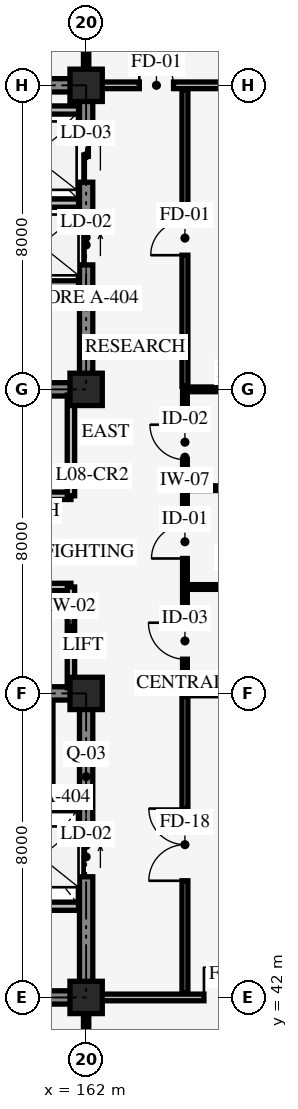
"""IFC4 building model, lengths in metres.
Left out: names, types, materials, properties, quantities, classifications, styles, units other than length and angle.
Written with IfcOpenShell. Run it as: python <this file> out.ifc"""

import sys

from ifc_helpers import new_model, si_unit, direction, frame, frame_2d, origin, origin_2d, place, context, subcontext, project, spatial, rectangle, extrude, element, fill, save


model = new_model("IFC4")
c1 = context("Model", 3, precision=1e-05, world=origin(), true_north=direction((0.0, 1.0)))
c2 = subcontext(c1, "Body", "Model", "MODEL_VIEW")
j1 = project(units=[si_unit("LENGTHUNIT", "METRE"), si_unit("PLANEANGLEUNIT", "RADIAN")], contexts=[c1])
p1 = place(None, origin())
s1 = spatial("IfcSite", under=j1, at=p1, CompositionType="ELEMENT")
p2 = place(p1, origin())
s2 = spatial("IfcBuilding", under=s1, at=p2, CompositionType="ELEMENT")
p3 = place(p2, frame((0.0, 0.0, 31.8)))
s3 = spatial("IfcBuildingStorey", under=s2, at=p3, CompositionType="ELEMENT", Elevation=31.8)
p4 = place(p3, frame((154.0, 42.0, 0.0), z_axis=(0.0, 0.0, 1.0), x_axis=(1.0, 0.0, 0.0)))
e1 = element("IfcWall", 1, at=p4, inside=s3, PredefinedType="SHEAR", context=c2, shape_type="SweptSolid", body=[
    extrude(rectangle(XDim=8.0, YDim=0.35, at=frame_2d((4.0, 0.0))), origin(), (0.0, 0.0, 1.0), 3.95),
])
p5 = place(p3, frame((162.0, 42.0, 0.0), z_axis=(0.0, 0.0, 1.0), x_axis=(0.0, 1.0, 0.0)))
e2 = element("IfcWall", 2, at=p5, inside=s3, PredefinedType="SHEAR", context=c2, shape_type="SweptSolid", body=[
    extrude(rectangle(XDim=8.0, YDim=0.35, at=frame_2d((4.0, 0.0))), origin(), (0.0, 0.0, 1.0), 3.95),
])
p6 = place(p5, frame((3.175, 0.0, 0.0)))
e3 = element("IfcOpeningElement", 3, at=p6, cuts=e2, PredefinedType="OPENING", context=c2, shape_type="SweptSolid", body=[
    extrude(rectangle(XDim=1.05, YDim=2.2, at=frame_2d((0.525, 1.1))), frame((0.0, 0.185, 0.0), z_axis=(0.0, -1.0, 0.0), x_axis=(1.0, 0.0, 0.0)), (0.0, 0.0, 1.0), 0.37),
])
p7 = place(p3, frame((162.0, 50.0, 0.0), z_axis=(0.0, 0.0, 1.0), x_axis=(-1.0, 0.0, 0.0)))
e4 = element("IfcWall", 4, at=p7, inside=s3, PredefinedType="SHEAR", context=c2, shape_type="SweptSolid", body=[
    extrude(rectangle(XDim=8.0, YDim=0.35, at=frame_2d((4.0, 0.0))), origin(), (0.0, 0.0, 1.0), 3.95),
])
p8 = place(p7, frame((5.3, 0.0, 0.0)))
e5 = element("IfcOpeningElement", 5, at=p8, cuts=e4, PredefinedType="OPENING", context=c2, shape_type="SweptSolid", body=[
    extrude(rectangle(XDim=1.3, YDim=2.15, at=frame_2d((0.65, 1.075))), frame((0.0, 0.185, 0.0), z_axis=(0.0, -1.0, 0.0), x_axis=(1.0, 0.0, 0.0)), (0.0, 0.0, 1.0), 0.37),
])
p9 = place(p7, frame((1.45, 0.0, 0.0)))
e6 = element("IfcOpeningElement", 6, at=p9, cuts=e4, PredefinedType="OPENING", context=c2, shape_type="SweptSolid", body=[
    extrude(rectangle(XDim=1.1, YDim=2.2, at=frame_2d((0.55, 1.1))), frame((0.0, 0.185, 0.0), z_axis=(0.0, -1.0, 0.0), x_axis=(1.0, 0.0, 0.0)), (0.0, 0.0, 1.0), 0.37),
])
p10 = place(p3, frame((154.0, 58.0, 0.0), z_axis=(0.0, 0.0, 1.0), x_axis=(1.0, 0.0, 0.0)))
e7 = element("IfcWall", 7, at=p10, inside=s3, PredefinedType="SHEAR", context=c2, shape_type="SweptSolid", body=[
    extrude(rectangle(XDim=8.0, YDim=0.35, at=frame_2d((4.0, 0.0))), origin(), (0.0, 0.0, 1.0), 3.95),
])
p11 = place(p10, frame((1.4, 0.0, 0.0)))
e8 = element("IfcOpeningElement", 8, at=p11, cuts=e7, PredefinedType="OPENING", context=c2, shape_type="SweptSolid", body=[
    extrude(rectangle(XDim=1.3, YDim=2.15, at=frame_2d((0.65, 1.075))), frame((0.0, 0.185, 0.0), z_axis=(0.0, -1.0, 0.0), x_axis=(1.0, 0.0, 0.0)), (0.0, 0.0, 1.0), 0.37),
])
p12 = place(p10, frame((5.3, 0.0, 0.0)))
e9 = element("IfcOpeningElement", 9, at=p12, cuts=e7, PredefinedType="OPENING", context=c2, shape_type="SweptSolid", body=[
    extrude(rectangle(XDim=1.1, YDim=2.2, at=frame_2d((0.55, 1.1))), frame((0.0, 0.185, 0.0), z_axis=(0.0, -1.0, 0.0), x_axis=(1.0, 0.0, 0.0)), (0.0, 0.0, 1.0), 0.37),
])
p13 = place(p3, frame((162.0, 58.0, 0.0), z_axis=(0.0, 0.0, 1.0), x_axis=(0.0, 1.0, 0.0)))
e10 = element("IfcWall", 10, at=p13, inside=s3, PredefinedType="SHEAR", context=c2, shape_type="SweptSolid", body=[
    extrude(rectangle(XDim=8.0, YDim=0.35, at=frame_2d((4.0, 0.0))), origin(), (0.0, 0.0, 1.0), 3.95),
])
p14 = place(p13, frame((3.275, 0.0, 0.0)))
e11 = element("IfcOpeningElement", 11, at=p14, cuts=e10, PredefinedType="OPENING", context=c2, shape_type="SweptSolid", body=[
    extrude(rectangle(XDim=1.05, YDim=2.2, at=frame_2d((0.525, 1.1))), frame((0.0, 0.185, 0.0), z_axis=(0.0, -1.0, 0.0), x_axis=(1.0, 0.0, 0.0)), (0.0, 0.0, 1.0), 0.37),
])
p15 = place(p13, frame((5.45, 0.0, 0.0)))
e12 = element("IfcOpeningElement", 12, at=p15, cuts=e10, PredefinedType="OPENING", context=c2, shape_type="SweptSolid", body=[
    extrude(rectangle(XDim=1.4, YDim=2.3, at=frame_2d((0.7, 1.15))), frame((0.0, 0.185, 0.0), z_axis=(0.0, -1.0, 0.0), x_axis=(1.0, 0.0, 0.0)), (0.0, 0.0, 1.0), 0.37),
])
p16 = place(p3, frame((162.0, 66.0, 0.0), z_axis=(0.0, 0.0, 1.0), x_axis=(-1.0, 0.0, 0.0)))
e13 = element("IfcWall", 13, at=p16, inside=s3, PredefinedType="SHEAR", context=c2, shape_type="SweptSolid", body=[
    extrude(rectangle(XDim=8.0, YDim=0.35, at=frame_2d((4.0, 0.0))), origin(), (0.0, 0.0, 1.0), 3.95),
])
for number, where, z_axis, x_axis in (
    (14, (162.0, 42.0, 0.0), (0.0, 0.0, 1.0), (1.0, 0.0, 0.0)),
    (15, (162.0, 50.0, 0.0), (0.0, 0.0, 1.0), (1.0, 0.0, 0.0)),
    (16, (162.0, 58.0, 0.0), (0.0, 0.0, 1.0), (1.0, 0.0, 0.0)),
    (17, (162.0, 66.0, 0.0), (0.0, 0.0, 1.0), (1.0, 0.0, 0.0)),
):
    element("IfcColumn", number, at=place(p3, frame(where, z_axis=z_axis, x_axis=x_axis)), inside=s3, PredefinedType="COLUMN", context=c2, shape_type="SweptSolid", body=[
        extrude(rectangle(XDim=0.85, YDim=0.85, at=origin_2d()), origin(), (0.0, 0.0, 1.0), 4.2),
    ])
p17 = place(p3, frame((158.45, 47.02, 0.0), z_axis=(0.0, 0.0, 1.0), x_axis=(1.0, 0.0, 0.0)))
e18 = element("IfcWall", 18, at=p17, inside=s3, PredefinedType="STANDARD", context=c2, shape_type="SweptSolid", body=[
    extrude(rectangle(XDim=3.35, YDim=0.215, at=frame_2d((1.675, 0.0))), origin(), (0.0, 0.0, 1.0), 3.9),
])
p18 = place(p3, frame((161.02, 47.02, 0.0), z_axis=(0.0, 0.0, 1.0), x_axis=(0.0, 1.0, 0.0)))
e19 = element("IfcWall", 19, at=p18, inside=s3, PredefinedType="STANDARD", context=c2, shape_type="SweptSolid", body=[
    extrude(rectangle(XDim=2.78, YDim=0.215, at=frame_2d((1.39, 0.0))), origin(), (0.0, 0.0, 1.0), 3.9),
])
p19 = place(p3, frame((159.78, 44.4, 0.0), z_axis=(0.0, 0.0, 1.0), x_axis=(1.0, 0.0, 0.0)))
e20 = element("IfcWall", 20, at=p19, inside=s3, PredefinedType="STANDARD", context=c2, shape_type="SweptSolid", body=[
    extrude(rectangle(XDim=2.02, YDim=0.215, at=frame_2d((1.01, 0.0))), origin(), (0.0, 0.0, 1.0), 3.9),
])
p20 = place(p3, frame((158.45, 62.9, 0.0), z_axis=(0.0, 0.0, 1.0), x_axis=(1.0, 0.0, 0.0)))
e21 = element("IfcWall", 21, at=p20, inside=s3, PredefinedType="STANDARD", context=c2, shape_type="SweptSolid", body=[
    extrude(rectangle(XDim=3.35, YDim=0.215, at=frame_2d((1.675, 0.0))), origin(), (0.0, 0.0, 1.0), 3.9),
])
p21 = place(p3, frame((159.38, 65.35, 0.0), z_axis=(0.0, 0.0, 1.0), x_axis=(1.0, 0.0, 0.0)))
e22 = element("IfcWall", 22, at=p21, inside=s3, PredefinedType="STANDARD", context=c2, shape_type="SweptSolid", body=[
    extrude(rectangle(XDim=2.42, YDim=0.215, at=frame_2d((1.21, 0.0))), origin(), (0.0, 0.0, 1.0), 3.9),
])
p22 = place(p3, frame((158.45, 60.75, 0.0), z_axis=(0.0, 0.0, 1.0), x_axis=(1.0, 0.0, 0.0)))
e23 = element("IfcWall", 23, at=p22, inside=s3, PredefinedType="STANDARD", context=c2, shape_type="SweptSolid", body=[
    extrude(rectangle(XDim=3.35, YDim=0.215, at=frame_2d((1.675, 0.0))), origin(), (0.0, 0.0, 1.0), 3.9),
])
p23 = place(p3, frame((154.0, 52.8, 0.0), z_axis=(0.0, 0.0, 1.0), x_axis=(1.0, 0.0, 0.0)))
e24 = element("IfcWall", 24, at=p23, inside=s3, PredefinedType="STANDARD", context=c2, shape_type="SweptSolid", body=[
    extrude(rectangle(XDim=7.6, YDim=0.195, at=frame_2d((3.8, 0.0))), origin(), (0.0, 0.0, 1.0), 3.9),
])
p24 = place(p23, frame((2.8, 0.0, 0.0)))
e25 = element("IfcOpeningElement", 25, at=p24, cuts=e24, PredefinedType="OPENING", context=c2, shape_type="SweptSolid", body=[
    extrude(rectangle(XDim=1.3, YDim=2.15, at=frame_2d((0.65, 1.075))), frame((0.0, 0.107, 0.0), z_axis=(0.0, -1.0, 0.0), x_axis=(1.0, 0.0, 0.0)), (0.0, 0.0, 1.0), 0.215),
])
p25 = place(p3, frame((161.6, 50.15, 0.0), z_axis=(0.0, 0.0, 1.0), x_axis=(0.0, 1.0, 0.0)))
e26 = element("IfcWall", 26, at=p25, inside=s3, PredefinedType="STANDARD", context=c2, shape_type="SweptSolid", body=[
    extrude(rectangle(XDim=2.65, YDim=0.195, at=frame_2d((1.325, 0.0))), origin(), (0.0, 0.0, 1.0), 3.31),
])
p26 = place(p3, frame((154.0, 55.2, 0.0), z_axis=(0.0, 0.0, 1.0), x_axis=(1.0, 0.0, 0.0)))
e27 = element("IfcWall", 27, at=p26, inside=s3, PredefinedType="STANDARD", context=c2, shape_type="SweptSolid", body=[
    extrude(rectangle(XDim=7.6, YDim=0.195, at=frame_2d((3.8, 0.0))), origin(), (0.0, 0.0, 1.0), 3.9),
])
p27 = place(p26, frame((2.8, 0.0, 0.0)))
e28 = element("IfcOpeningElement", 28, at=p27, cuts=e27, PredefinedType="OPENING", context=c2, shape_type="SweptSolid", body=[
    extrude(rectangle(XDim=1.4, YDim=2.2, at=frame_2d((0.7, 1.1))), frame((0.0, 0.107, 0.0), z_axis=(0.0, -1.0, 0.0), x_axis=(1.0, 0.0, 0.0)), (0.0, 0.0, 1.0), 0.215),
])
p28 = place(p3, frame((161.6, 55.2, 0.0), z_axis=(0.0, 0.0, 1.0), x_axis=(0.0, 1.0, 0.0)))
e29 = element("IfcWall", 29, at=p28, inside=s3, PredefinedType="STANDARD", context=c2, shape_type="SweptSolid", body=[
    extrude(rectangle(XDim=2.65, YDim=0.195, at=frame_2d((1.325, 0.0))), origin(), (0.0, 0.0, 1.0), 3.31),
])
p29 = place(p3, frame((164.6, 50.0, 0.0), z_axis=(0.0, 0.0, 1.0), x_axis=(0.0, 1.0, 0.0)))
e30 = element("IfcWall", 30, at=p29, inside=s3, PredefinedType="STANDARD", context=c2, shape_type="SweptSolid", body=[
    extrude(rectangle(XDim=8.0, YDim=0.125, at=frame_2d((4.0, 0.0))), origin(), (0.0, 0.0, 1.0), 3.9),
])
p30 = place(p29, frame((0.9, 0.0, 0.0)))
e31 = element("IfcOpeningElement", 31, at=p30, cuts=e30, PredefinedType="OPENING", context=c2, shape_type="SweptSolid", body=[
    extrude(rectangle(XDim=0.96, YDim=2.08, at=frame_2d((0.48, 1.04))), frame((0.0, 0.073, 0.0), z_axis=(0.0, -1.0, 0.0), x_axis=(1.0, 0.0, 0.0)), (0.0, 0.0, 1.0), 0.145),
])
p31 = place(p29, frame((3.55, 0.0, 0.0)))
e32 = element("IfcOpeningElement", 32, at=p31, cuts=e30, PredefinedType="OPENING", context=c2, shape_type="SweptSolid", body=[
    extrude(rectangle(XDim=0.88, YDim=2.05, at=frame_2d((0.44, 1.025))), frame((0.0, 0.073, 0.0), z_axis=(0.0, -1.0, 0.0), x_axis=(1.0, 0.0, 0.0)), (0.0, 0.0, 1.0), 0.145),
])
p32 = place(p29, frame((6.15, 0.0, 0.0)))
e33 = element("IfcOpeningElement", 33, at=p32, cuts=e30, PredefinedType="OPENING", context=c2, shape_type="SweptSolid", body=[
    extrude(rectangle(XDim=0.92, YDim=2.05, at=frame_2d((0.46, 1.025))), frame((0.0, 0.073, 0.0), z_axis=(0.0, -1.0, 0.0), x_axis=(1.0, 0.0, 0.0)), (0.0, 0.0, 1.0), 0.145),
])
p33 = place(p3, frame((164.6, 50.0, 0.0), z_axis=(0.0, 0.0, 1.0), x_axis=(1.0, 0.0, 0.0)))
e34 = element("IfcWall", 34, at=p33, inside=s3, PredefinedType="STANDARD", context=c2, shape_type="SweptSolid", body=[
    extrude(rectangle(XDim=3.8, YDim=0.125, at=frame_2d((1.9, 0.0))), origin(), (0.0, 0.0, 1.0), 3.26),
])
for number, where, z_axis, x_axis in (
    (35, (164.6, 52.8, 0.0), (0.0, 0.0, 1.0), (1.0, 0.0, 0.0)),
    (36, (164.6, 55.4, 0.0), (0.0, 0.0, 1.0), (1.0, 0.0, 0.0)),
):
    element("IfcWall", number, at=place(p3, frame(where, z_axis=z_axis, x_axis=x_axis)), inside=s3, PredefinedType="STANDARD", context=c2, shape_type="SweptSolid", body=[
        extrude(rectangle(XDim=3.8, YDim=0.125, at=frame_2d((1.9, 0.0))), origin(), (0.0, 0.0, 1.0), 3.9),
    ])
p34 = place(p3, frame((164.6, 58.0, 0.0), z_axis=(0.0, 0.0, 1.0), x_axis=(1.0, 0.0, 0.0)))
e37 = element("IfcWall", 37, at=p34, inside=s3, PredefinedType="STANDARD", context=c2, shape_type="SweptSolid", body=[
    extrude(rectangle(XDim=3.8, YDim=0.125, at=frame_2d((1.9, 0.0))), origin(), (0.0, 0.0, 1.0), 3.26),
])
p35 = place(p3, frame((164.6, 42.12, 0.0), z_axis=(0.0, 0.0, 1.0), x_axis=(0.0, 1.0, 0.0)))
e38 = element("IfcWall", 38, at=p35, inside=s3, PredefinedType="STANDARD", context=c2, shape_type="SweptSolid", body=[
    extrude(rectangle(XDim=7.8, YDim=0.155, at=frame_2d((3.9, 0.0))), origin(), (0.0, 0.0, 1.0), 3.9),
])
p36 = place(p35, frame((2.95, 0.0, 0.0)))
e39 = element("IfcOpeningElement", 39, at=p36, cuts=e38, PredefinedType="OPENING", context=c2, shape_type="SweptSolid", body=[
    extrude(rectangle(XDim=1.9, YDim=2.35, at=frame_2d((0.95, 1.175))), frame((0.0, 0.087, 0.0), z_axis=(0.0, -1.0, 0.0), x_axis=(1.0, 0.0, 0.0)), (0.0, 0.0, 1.0), 0.175),
])
p37 = place(p3, frame((164.6, 58.08, 0.0), z_axis=(0.0, 0.0, 1.0), x_axis=(0.0, 1.0, 0.0)))
e40 = element("IfcWall", 40, at=p37, inside=s3, PredefinedType="STANDARD", context=c2, shape_type="SweptSolid", body=[
    extrude(rectangle(XDim=7.8, YDim=0.155, at=frame_2d((3.9, 0.0))), origin(), (0.0, 0.0, 1.0), 3.9),
])
p38 = place(p37, frame((3.45, 0.0, 0.0)))
e41 = element("IfcOpeningElement", 41, at=p38, cuts=e40, PredefinedType="OPENING", context=c2, shape_type="SweptSolid", body=[
    extrude(rectangle(XDim=0.9, YDim=2.1, at=frame_2d((0.45, 1.05))), frame((0.0, 0.087, 0.0), z_axis=(0.0, -1.0, 0.0), x_axis=(1.0, 0.0, 0.0)), (0.0, 0.0, 1.0), 0.175),
])
p39 = place(p3, frame((162.0, 34.05, 0.0), z_axis=(0.0, 0.0, 1.0), x_axis=(0.0, 1.0, 0.0)))
e42 = element("IfcWall", 42, at=p39, inside=s3, PredefinedType="STANDARD", context=c2, shape_type="SweptSolid", body=[
    extrude(rectangle(XDim=7.83, YDim=0.14, at=frame_2d((3.915, 0.0))), origin(), (0.0, 0.0, 1.0), 3.31),
])
p40 = place(p39, frame((3.0, 0.0, 0.0)))
e43 = element("IfcOpeningElement", 43, at=p40, cuts=e42, PredefinedType="OPENING", context=c2, shape_type="SweptSolid", body=[
    extrude(rectangle(XDim=1.06, YDim=2.12, at=frame_2d((0.53, 1.06))), frame((0.0, 0.08, 0.0), z_axis=(0.0, -1.0, 0.0), x_axis=(1.0, 0.0, 0.0)), (0.0, 0.0, 1.0), 0.16),
])
p41 = place(p3, frame((162.35, 42.0, 0.0), z_axis=(0.0, 0.0, 1.0), x_axis=(1.0, 0.0, 0.0)))
e44 = element("IfcWall", 44, at=p41, inside=s3, PredefinedType="STANDARD", context=c2, shape_type="SweptSolid", body=[
    extrude(rectangle(XDim=14.7, YDim=0.175, at=frame_2d((7.35, 0.0))), origin(), (0.0, 0.0, 1.0), 3.26),
])
p42 = place(p41, frame((2.75, 0.0, 0.0)))
e45 = element("IfcOpeningElement", 45, at=p42, cuts=e44, PredefinedType="OPENING", context=c2, shape_type="SweptSolid", body=[
    extrude(rectangle(XDim=1.6, YDim=2.25, at=frame_2d((0.8, 1.125))), frame((0.0, 0.098, 0.0), z_axis=(0.0, -1.0, 0.0), x_axis=(1.0, 0.0, 0.0)), (0.0, 0.0, 1.0), 0.195),
])
p43 = place(p3, frame((162.0, 66.12, 0.0), z_axis=(0.0, 0.0, 1.0), x_axis=(0.0, 1.0, 0.0)))
e46 = element("IfcWall", 46, at=p43, inside=s3, PredefinedType="STANDARD", context=c2, shape_type="SweptSolid", body=[
    extrude(rectangle(XDim=7.83, YDim=0.14, at=frame_2d((3.915, 0.0))), origin(), (0.0, 0.0, 1.0), 3.31),
])
p44 = place(p43, frame((3.0, 0.0, 0.0)))
e47 = element("IfcOpeningElement", 47, at=p44, cuts=e46, PredefinedType="OPENING", context=c2, shape_type="SweptSolid", body=[
    extrude(rectangle(XDim=1.12, YDim=2.12, at=frame_2d((0.56, 1.06))), frame((0.0, 0.08, 0.0), z_axis=(0.0, -1.0, 0.0), x_axis=(1.0, 0.0, 0.0)), (0.0, 0.0, 1.0), 0.16),
])
p45 = place(p3, frame((162.35, 66.0, 0.0), z_axis=(0.0, 0.0, 1.0), x_axis=(1.0, 0.0, 0.0)))
e48 = element("IfcWall", 48, at=p45, inside=s3, PredefinedType="STANDARD", context=c2, shape_type="SweptSolid", body=[
    extrude(rectangle(XDim=14.7, YDim=0.175, at=frame_2d((7.35, 0.0))), origin(), (0.0, 0.0, 1.0), 3.26),
])
p46 = place(p45, frame((1.05, 0.0, 0.0)))
e49 = element("IfcOpeningElement", 49, at=p46, cuts=e48, PredefinedType="OPENING", context=c2, shape_type="SweptSolid", body=[
    extrude(rectangle(XDim=0.9, YDim=2.1, at=frame_2d((0.45, 1.05))), frame((0.0, 0.098, 0.0), z_axis=(0.0, -1.0, 0.0), x_axis=(1.0, 0.0, 0.0)), (0.0, 0.0, 1.0), 0.195),
])
p47 = place(p6, origin())
e50 = element("IfcDoor", 50, at=p47, inside=s3, OperationType="SLIDING_TO_LEFT", PredefinedType="DOOR", context=c2, shape_type="SweptSolid", body=[
    extrude(rectangle(XDim=1.05, YDim=2.2, at=frame_2d((0.525, 1.1))), frame((0.0, 0.025, 0.0), z_axis=(0.0, -1.0, 0.0), x_axis=(1.0, 0.0, 0.0)), (0.0, 0.0, 1.0), 0.05),
])
fill(e3, e50)
p48 = place(p14, origin())
e51 = element("IfcDoor", 51, at=p48, inside=s3, OperationType="SLIDING_TO_RIGHT", PredefinedType="DOOR", context=c2, shape_type="SweptSolid", body=[
    extrude(rectangle(XDim=1.05, YDim=2.2, at=frame_2d((0.525, 1.1))), frame((0.0, 0.025, 0.0), z_axis=(0.0, -1.0, 0.0), x_axis=(1.0, 0.0, 0.0)), (0.0, 0.0, 1.0), 0.05),
])
fill(e11, e51)
p49 = place(p15, origin())
e52 = element("IfcDoor", 52, at=p49, inside=s3, OperationType="DOUBLE_DOOR_SLIDING", PredefinedType="DOOR", context=c2, shape_type="SweptSolid", body=[
    extrude(rectangle(XDim=1.4, YDim=2.3, at=frame_2d((0.7, 1.15))), frame((0.0, 0.025, 0.0), z_axis=(0.0, -1.0, 0.0), x_axis=(1.0, 0.0, 0.0)), (0.0, 0.0, 1.0), 0.05),
])
fill(e12, e52)
p50 = place(p30, origin())
e53 = element("IfcDoor", 53, at=p50, inside=s3, OperationType="SINGLE_SWING_RIGHT", PredefinedType="DOOR", context=c2, shape_type="SweptSolid", body=[
    extrude(rectangle(XDim=0.96, YDim=2.08, at=frame_2d((0.48, 1.04))), frame((0.0, 0.025, 0.0), z_axis=(0.0, -1.0, 0.0), x_axis=(1.0, 0.0, 0.0)), (0.0, 0.0, 1.0), 0.05),
])
fill(e31, e53)
p51 = place(p31, origin())
e54 = element("IfcDoor", 54, at=p51, inside=s3, OperationType="SINGLE_SWING_LEFT", PredefinedType="DOOR", context=c2, shape_type="SweptSolid", body=[
    extrude(rectangle(XDim=0.88, YDim=2.05, at=frame_2d((0.44, 1.025))), frame((0.0, 0.025, 0.0), z_axis=(0.0, -1.0, 0.0), x_axis=(1.0, 0.0, 0.0)), (0.0, 0.0, 1.0), 0.05),
])
fill(e32, e54)
p52 = place(p32, origin())
e55 = element("IfcDoor", 55, at=p52, inside=s3, OperationType="SINGLE_SWING_RIGHT", PredefinedType="DOOR", context=c2, shape_type="SweptSolid", body=[
    extrude(rectangle(XDim=0.92, YDim=2.05, at=frame_2d((0.46, 1.025))), frame((0.0, 0.025, 0.0), z_axis=(0.0, -1.0, 0.0), x_axis=(1.0, 0.0, 0.0)), (0.0, 0.0, 1.0), 0.05),
])
fill(e33, e55)
p53 = place(p36, origin())
e56 = element("IfcDoor", 56, at=p53, inside=s3, OperationType="DOUBLE_DOOR_SINGLE_SWING", PredefinedType="DOOR", context=c2, shape_type="SweptSolid", body=[
    extrude(rectangle(XDim=1.9, YDim=2.35, at=frame_2d((0.95, 1.175))), frame((0.0, 0.025, 0.0), z_axis=(0.0, -1.0, 0.0), x_axis=(1.0, 0.0, 0.0)), (0.0, 0.0, 1.0), 0.05),
])
fill(e39, e56)
p54 = place(p38, origin())
e57 = element("IfcDoor", 57, at=p54, inside=s3, OperationType="SINGLE_SWING_LEFT", PredefinedType="DOOR", context=c2, shape_type="SweptSolid", body=[
    extrude(rectangle(XDim=0.9, YDim=2.1, at=frame_2d((0.45, 1.05))), frame((0.0, 0.025, 0.0), z_axis=(0.0, -1.0, 0.0), x_axis=(1.0, 0.0, 0.0)), (0.0, 0.0, 1.0), 0.05),
])
fill(e41, e57)
p55 = place(p42, origin())
e58 = element("IfcDoor", 58, at=p55, inside=s3, OperationType="DOUBLE_DOOR_SINGLE_SWING", PredefinedType="DOOR", context=c2, shape_type="SweptSolid", body=[
    extrude(rectangle(XDim=1.6, YDim=2.25, at=frame_2d((0.8, 1.125))), frame((0.0, 0.025, 0.0), z_axis=(0.0, -1.0, 0.0), x_axis=(1.0, 0.0, 0.0)), (0.0, 0.0, 1.0), 0.05),
])
fill(e45, e58)
p56 = place(p46, origin())
e59 = element("IfcDoor", 59, at=p56, inside=s3, OperationType="SINGLE_SWING_LEFT", PredefinedType="DOOR", context=c2, shape_type="SweptSolid", body=[
    extrude(rectangle(XDim=0.9, YDim=2.1, at=frame_2d((0.45, 1.05))), frame((0.0, 0.025, 0.0), z_axis=(0.0, -1.0, 0.0), x_axis=(1.0, 0.0, 0.0)), (0.0, 0.0, 1.0), 0.05),
])
fill(e49, e59)
save(model, sys.argv[1])
